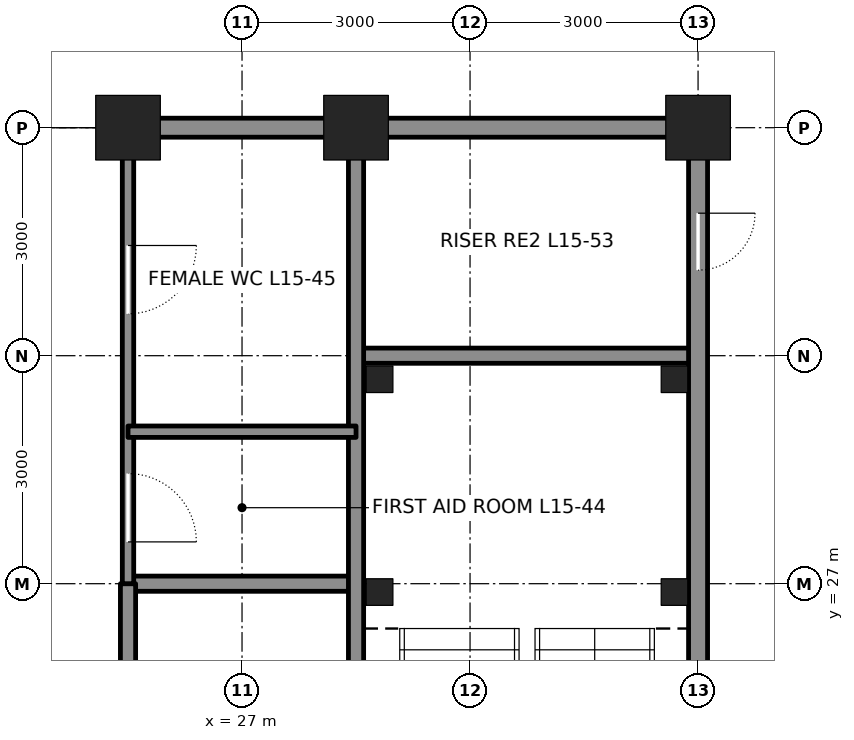
"""IFC4 building model, lengths in metres.
Left out: names, types, materials, properties, quantities, classifications, styles, units other than length and angle.
Written with IfcOpenShell. Run it as: python <this file> out.ifc"""

import sys

from ifc_helpers import new_model, si_unit, direction, frame, frame_2d, origin, origin_2d, place, context, subcontext, project, spatial, rectangle, hollow_rectangle, extrude, element, fill, save


model = new_model("IFC4")
c1 = context("Model", 3, precision=1e-05, world=origin(), true_north=direction((0.0, 1.0)))
c2 = subcontext(c1, "Body", "Model", "MODEL_VIEW")
j1 = project(units=[si_unit("LENGTHUNIT", "METRE"), si_unit("PLANEANGLEUNIT", "RADIAN")], contexts=[c1])
p1 = place(None, origin())
s1 = spatial("IfcSite", under=j1, at=p1, CompositionType="ELEMENT")
p2 = place(p1, origin())
s2 = spatial("IfcBuilding", under=s1, at=p2, CompositionType="ELEMENT")
p3 = place(p2, frame((0.0, 0.0, 73.8)))
s3 = spatial("IfcBuildingStorey", under=s2, at=p3, CompositionType="ELEMENT", Elevation=73.8)
for number, where, z_axis, x_axis in (
    (1, (25.5, 33.0, 0.0), (0.0, 0.0, 1.0), (1.0, 0.0, 0.0)),
    (2, (28.5, 33.0, 0.0), (0.0, 0.0, 1.0), (1.0, 0.0, 0.0)),
    (3, (33.0, 33.0, 0.0), (0.0, 0.0, 1.0), (1.0, 0.0, 0.0)),
):
    element("IfcColumn", number, at=place(p3, frame(where, z_axis=z_axis, x_axis=x_axis)), inside=s3, PredefinedType="COLUMN", context=c2, shape_type="SweptSolid", body=[
        extrude(hollow_rectangle(XDim=0.85, YDim=0.85, WallThickness=0.085, at=origin_2d()), origin(), (0.0, 0.0, 1.0), 4.5),
    ])
p4 = place(p3, frame((25.5, 27.0, 0.0), z_axis=(0.0, 0.0, 1.0), x_axis=(1.0, 0.0, 0.0)))
e4 = element("IfcWall", 4, at=p4, inside=s3, PredefinedType="SOLIDWALL", context=c2, shape_type="SweptSolid", body=[
    extrude(rectangle(XDim=3.0, YDim=0.2, at=frame_2d((1.5, 0.0))), origin(), (0.0, 0.0, 1.0), 4.34),
])
p5 = place(p3, frame((28.5, 30.0, 0.0), z_axis=(0.0, 0.0, 1.0), x_axis=(1.0, 0.0, 0.0)))
e5 = element("IfcWall", 5, at=p5, inside=s3, PredefinedType="SOLIDWALL", context=c2, shape_type="SweptSolid", body=[
    extrude(rectangle(XDim=4.5, YDim=0.2, at=frame_2d((2.25, 0.0))), origin(), (0.0, 0.0, 1.0), 4.34),
])
p6 = place(p3, frame((25.75, 33.0, 0.0), z_axis=(0.0, 0.0, 1.0), x_axis=(1.0, 0.0, 0.0)))
e6 = element("IfcWall", 6, at=p6, inside=s3, PredefinedType="SOLIDWALL", context=c2, shape_type="SweptSolid", body=[
    extrude(rectangle(XDim=2.5, YDim=0.25, at=frame_2d((1.25, 0.0))), origin(), (0.0, 0.0, 1.0), 3.181),
])
p7 = place(p3, frame((28.75, 33.0, 0.0), z_axis=(0.0, 0.0, 1.0), x_axis=(1.0, 0.0, 0.0)))
e7 = element("IfcWall", 7, at=p7, inside=s3, PredefinedType="SOLIDWALL", context=c2, shape_type="SweptSolid", body=[
    extrude(rectangle(XDim=4.0, YDim=0.25, at=frame_2d((2.0, 0.0))), origin(), (0.0, 0.0, 1.0), 3.181),
])
p8 = place(p3, frame((25.5, 15.0, 0.0), z_axis=(0.0, 0.0, 1.0), x_axis=(0.0, 1.0, 0.0)))
e8 = element("IfcWall", 8, at=p8, inside=s3, PredefinedType="SOLIDWALL", context=c2, shape_type="SweptSolid", body=[
    extrude(rectangle(XDim=12.0, YDim=0.2, at=frame_2d((6.0, 0.0))), origin(), (0.0, 0.0, 1.0), 3.365),
])
p9 = place(p3, frame((25.5, 27.0, 0.0), z_axis=(0.0, 0.0, 1.0), x_axis=(0.0, 1.0, 0.0)))
e9 = element("IfcWall", 9, at=p9, inside=s3, PredefinedType="PARTITIONING", context=c2, shape_type="SweptSolid", body=[
    extrude(rectangle(XDim=5.75, YDim=0.15, at=frame_2d((2.875, 0.0))), origin(), (0.0, 0.0, 1.0), 3.365),
])
p10 = place(p9, frame((0.55, 0.0, 0.0)))
e10 = element("IfcOpeningElement", 10, at=p10, cuts=e9, PredefinedType="OPENING", context=c2, shape_type="SweptSolid", body=[
    extrude(rectangle(XDim=0.9, YDim=2.1, at=frame_2d((0.45, 1.05))), frame((0.0, 0.085, 0.0), z_axis=(0.0, -1.0, 0.0), x_axis=(1.0, 0.0, 0.0)), (0.0, 0.0, 1.0), 0.17),
])
p11 = place(p9, frame((3.55, 0.0, 0.0)))
e11 = element("IfcOpeningElement", 11, at=p11, cuts=e9, PredefinedType="OPENING", context=c2, shape_type="SweptSolid", body=[
    extrude(rectangle(XDim=0.9, YDim=2.1, at=frame_2d((0.45, 1.05))), frame((0.0, 0.085, 0.0), z_axis=(0.0, -1.0, 0.0), x_axis=(1.0, 0.0, 0.0)), (0.0, 0.0, 1.0), 0.17),
])
p12 = place(p3, frame((28.5, 24.25, 0.0), z_axis=(0.0, 0.0, 1.0), x_axis=(0.0, 1.0, 0.0)))
e12 = element("IfcWall", 12, at=p12, inside=s3, PredefinedType="SOLIDWALL", context=c2, shape_type="SweptSolid", body=[
    extrude(rectangle(XDim=8.5, YDim=0.2, at=frame_2d((4.25, 0.0))), origin(), (0.0, 0.0, 1.0), 3.413),
])
p13 = place(p3, frame((33.0, 24.25, 0.0), z_axis=(0.0, 0.0, 1.0), x_axis=(0.0, 1.0, 0.0)))
e13 = element("IfcWall", 13, at=p13, inside=s3, PredefinedType="SOLIDWALL", context=c2, shape_type="SweptSolid", body=[
    extrude(rectangle(XDim=8.5, YDim=0.25, at=frame_2d((4.25, 0.0))), origin(), (0.0, 0.0, 1.0), 3.113),
])
p14 = place(p13, frame((6.875, 0.0, 0.0)))
e14 = element("IfcOpeningElement", 14, at=p14, cuts=e13, PredefinedType="OPENING", context=c2, shape_type="SweptSolid", body=[
    extrude(rectangle(XDim=0.75, YDim=2.1, at=frame_2d((0.375, 1.05))), frame((0.0, 0.135, 0.0), z_axis=(0.0, -1.0, 0.0), x_axis=(1.0, 0.0, 0.0)), (0.0, 0.0, 1.0), 0.27),
])
p15 = place(p3, frame((25.5, 29.0, 0.0), z_axis=(0.0, 0.0, 1.0), x_axis=(1.0, 0.0, 0.0)))
e15 = element("IfcWall", 15, at=p15, inside=s3, PredefinedType="PARTITIONING", context=c2, shape_type="SweptSolid", body=[
    extrude(rectangle(XDim=3.0, YDim=0.15, at=frame_2d((1.5, 0.0))), origin(), (0.0, 0.0, 1.0), 4.34),
])
for number, where, z_axis, x_axis in (
    (16, (28.81, 29.69, 0.0), (0.0, 0.0, 1.0), (1.0, 0.0, 0.0)),
    (17, (32.69, 29.69, 0.0), (0.0, 0.0, 1.0), (1.0, 0.0, 0.0)),
    (18, (28.81, 26.89, 0.0), (0.0, 0.0, 1.0), (1.0, 0.0, 0.0)),
    (19, (32.69, 26.89, 0.0), (0.0, 0.0, 1.0), (1.0, 0.0, 0.0)),
):
    element("IfcColumn", number, at=place(p3, frame(where, z_axis=z_axis, x_axis=x_axis)), inside=s3, PredefinedType="COLUMN", context=c2, shape_type="SweptSolid", body=[
        extrude(hollow_rectangle(XDim=0.35, YDim=0.35, WallThickness=0.035, at=origin_2d()), origin(), (0.0, 0.0, 1.0), 4.5),
    ])
p16 = place(p14, frame((0.75, 0.0, 0.0), z_axis=(0.0, 0.0, 1.0), x_axis=(-1.0, 0.0, 0.0)))
e20 = element("IfcDoor", 20, at=p16, inside=s3, OperationType="SINGLE_SWING_LEFT", PredefinedType="DOOR", context=c2, shape_type="SweptSolid", body=[
    extrude(rectangle(XDim=0.75, YDim=2.1, at=frame_2d((0.375, 1.05))), frame((0.0, 0.025, 0.0), z_axis=(0.0, -1.0, 0.0), x_axis=(1.0, 0.0, 0.0)), (0.0, 0.0, 1.0), 0.05),
])
fill(e14, e20)
p17 = place(p10, frame((0.9, 0.0, 0.0), z_axis=(0.0, 0.0, 1.0), x_axis=(-1.0, 0.0, 0.0)))
e21 = element("IfcDoor", 21, at=p17, inside=s3, OperationType="SINGLE_SWING_RIGHT", PredefinedType="DOOR", context=c2, shape_type="SweptSolid", body=[
    extrude(rectangle(XDim=0.9, YDim=2.1, at=frame_2d((0.45, 1.05))), frame((0.0, 0.025, 0.0), z_axis=(0.0, -1.0, 0.0), x_axis=(1.0, 0.0, 0.0)), (0.0, 0.0, 1.0), 0.05),
])
fill(e10, e21)
p18 = place(p11, frame((0.9, 0.0, 0.0), z_axis=(0.0, 0.0, 1.0), x_axis=(-1.0, 0.0, 0.0)))
e22 = element("IfcDoor", 22, at=p18, inside=s3, OperationType="SINGLE_SWING_LEFT", PredefinedType="DOOR", context=c2, shape_type="SweptSolid", body=[
    extrude(rectangle(XDim=0.9, YDim=2.1, at=frame_2d((0.45, 1.05))), frame((0.0, 0.025, 0.0), z_axis=(0.0, -1.0, 0.0), x_axis=(1.0, 0.0, 0.0)), (0.0, 0.0, 1.0), 0.05),
])
fill(e11, e22)
save(model, sys.argv[1])
